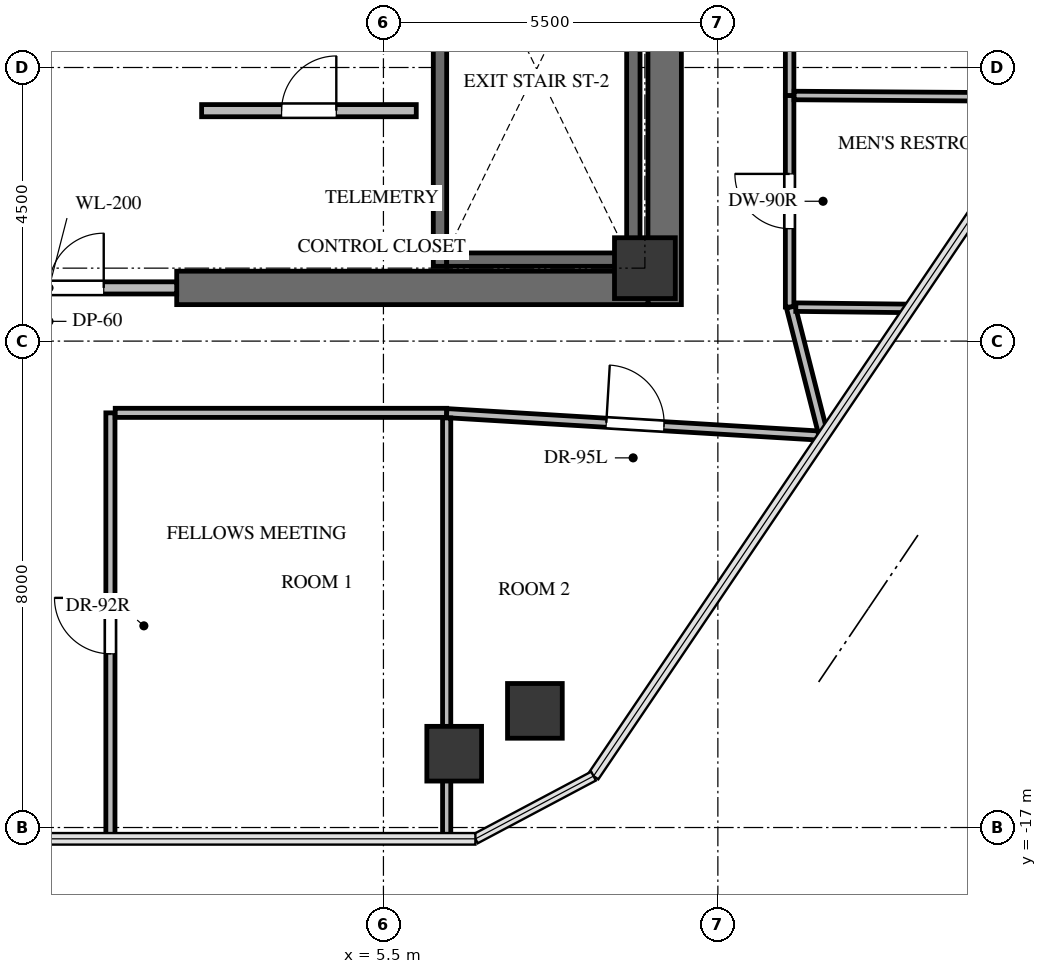
"""IFC4 building model, lengths in metres.
Left out: names, types, materials, properties, quantities, classifications, styles, units other than length and angle.
Written with IfcOpenShell. Run it as: python <this file> out.ifc"""

import sys

from ifc_helpers import new_model, si_unit, direction, frame, frame_2d, origin, origin_2d, place, context, subcontext, project, spatial, rectangle, extrude, source, transform, mapped, element, fill, save


model = new_model("IFC4")
c1 = context("Model", 3, precision=1e-05, world=origin(), true_north=direction((0.0, 1.0)))
c2 = subcontext(c1, "Body", "Model", "MODEL_VIEW")
j1 = project(units=[si_unit("LENGTHUNIT", "METRE"), si_unit("PLANEANGLEUNIT", "RADIAN")], contexts=[c1])
p1 = place(None, origin())
s1 = spatial("IfcSite", under=j1, at=p1, CompositionType="ELEMENT")
p2 = place(p1, origin())
s2 = spatial("IfcBuilding", under=s1, at=p2, CompositionType="ELEMENT")
p3 = place(p2, frame((0.0, 0.0, 258.1)))
s3 = spatial("IfcBuildingStorey", under=s2, at=p3, CompositionType="ELEMENT", Elevation=258.1)
p4 = place(p3, frame((10.125, -8.4, 0.0), z_axis=(0.0, 0.0, 1.0), x_axis=(0.0, 1.0, 0.0)))
e1 = element("IfcWall", 1, at=p4, inside=s3, PredefinedType="SHEAR", context=c2, shape_type="SweptSolid", body=[
    extrude(rectangle(XDim=16.8, YDim=0.55, at=frame_2d((8.4, 0.0))), origin(), (0.0, 0.0, 1.0), 3.4),
])
p5 = place(p3, frame((2.1, -8.125, 0.0), z_axis=(0.0, 0.0, 1.0), x_axis=(1.0, 0.0, 0.0)))
e2 = element("IfcWall", 2, at=p5, inside=s3, PredefinedType="SHEAR", context=c2, shape_type="SweptSolid", body=[
    extrude(rectangle(XDim=7.75, YDim=0.55, at=frame_2d((3.875, 0.0))), origin(), (0.0, 0.0, 1.0), 3.4),
])
p6 = place(p3, frame((9.61, -7.77, -0.24), z_axis=(0.0, 0.0, 1.0), x_axis=(0.0, 1.0, 0.0)))
e3 = element("IfcWall", 3, at=p6, inside=s3, PredefinedType="SHEAR", context=c2, shape_type="SweptSolid", body=[
    extrude(rectangle(XDim=7.89, YDim=0.22, at=frame_2d((3.945, 0.0))), origin(), (0.0, 0.0, 1.0), 3.4),
])
p7 = place(p3, frame((6.43, 0.12, -0.24), z_axis=(0.0, 0.0, 1.0), x_axis=(0.0, -1.0, 0.0)))
e4 = element("IfcWall", 4, at=p7, inside=s3, PredefinedType="SHEAR", context=c2, shape_type="SweptSolid", body=[
    extrude(rectangle(XDim=7.89, YDim=0.22, at=frame_2d((3.945, 0.0))), origin(), (0.0, 0.0, 1.0), 3.4),
])
p8 = place(p7, frame((0.52, 0.0, 0.0)))
e5 = element("IfcOpeningElement", 5, at=p8, cuts=e4, PredefinedType="OPENING", context=c2, shape_type="SweptSolid", body=[
    extrude(rectangle(XDim=1.05, YDim=2.15, at=frame_2d((0.525, 1.075))), frame((0.0, 0.12, 0.0), z_axis=(0.0, -1.0, 0.0), x_axis=(1.0, 0.0, 0.0)), (0.0, 0.0, 1.0), 0.24),
])
p9 = place(p3, frame((6.54, -7.66, -0.24), z_axis=(0.0, 0.0, 1.0), x_axis=(1.0, 0.0, 0.0)))
e6 = element("IfcWall", 6, at=p9, inside=s3, PredefinedType="SHEAR", context=c2, shape_type="SweptSolid", body=[
    extrude(rectangle(XDim=2.96, YDim=0.22, at=frame_2d((1.48, 0.0))), origin(), (0.0, 0.0, 1.0), 3.4),
])
m1 = source(origin(), c2, "Body", "SweptSolid", [
    extrude(rectangle(XDim=1.0, YDim=1.0, at=origin_2d()), origin(), (0.0, 0.0, 1.0), 3.4),
])
p10 = place(p3, frame((9.8, -7.8, -0.24), z_axis=(0.0, 0.0, 1.0), x_axis=(1.0, 0.0, 0.0)))
e7 = element("IfcColumn", 7, at=p10, inside=s3, PredefinedType="COLUMN", context=c2, shape_type="MappedRepresentation", body=[
    mapped(m1, transform((0.0, 0.0, 0.0), x_axis=(1.0, 0.0, 0.0), y_axis=(0.0, 1.0, 0.0), z_axis=(0.0, 0.0, 1.0), scale=1.0)),
])
m2 = source(origin(), c2, "Body", "SweptSolid", [
    extrude(rectangle(XDim=0.9, YDim=0.9, at=origin_2d()), origin(), (0.0, 0.0, 1.0), 3.4),
])
for number, where, z_axis, x_axis in (
    (8, (7.991, -15.081, -0.24), (0.0, 0.0, 1.0), (1.0, 0.0, 0.0)),
    (9, (6.664, -15.786, -0.24), (0.0, 0.0, 1.0), (1.0, 0.0, 0.0)),
):
    element("IfcColumn", number, at=place(p3, frame(where, z_axis=z_axis, x_axis=x_axis)), inside=s3, PredefinedType="COLUMN", context=c2, shape_type="MappedRepresentation", body=[
        mapped(m2, transform((0.0, 0.0, 0.0), x_axis=(1.0, 0.0, 0.0), y_axis=(0.0, 1.0, 0.0), z_axis=(0.0, 0.0, 1.0), scale=1.0)),
    ])
p11 = place(p3, frame((-2.1, -8.125, 0.0), z_axis=(0.0, 0.0, 1.0), x_axis=(1.0, 0.0, 0.0)))
e10 = element("IfcWall", 10, at=p11, inside=s3, PredefinedType="SOLIDWALL", context=c2, shape_type="SweptSolid", body=[
    extrude(rectangle(XDim=4.2, YDim=0.2, at=frame_2d((2.1, 0.0))), origin(), (0.0, 0.0, 1.0), 3.145),
])
p12 = place(p11, frame((1.2, 0.0, 0.0)))
e11 = element("IfcOpeningElement", 11, at=p12, cuts=e10, PredefinedType="OPENING", context=c2, shape_type="SweptSolid", body=[
    extrude(rectangle(XDim=1.8, YDim=2.15, at=frame_2d((0.9, 1.075))), frame((0.0, 0.11, 0.0), z_axis=(0.0, -1.0, 0.0), x_axis=(1.0, 0.0, 0.0)), (0.0, 0.0, 1.0), 0.22),
])
p13 = place(p3, frame((2.51, -5.21, 0.0), z_axis=(0.0, 0.0, 1.0), x_axis=(1.0, 0.0, 0.0)))
e12 = element("IfcWall", 12, at=p13, inside=s3, PredefinedType="SOLIDWALL", context=c2, shape_type="SweptSolid", body=[
    extrude(rectangle(XDim=3.53, YDim=0.2, at=frame_2d((1.765, 0.0))), origin(), (0.0, 0.0, 1.0), 3.145),
])
p14 = place(p13, frame((1.315, 0.0, 0.0)))
e13 = element("IfcOpeningElement", 13, at=p14, cuts=e12, PredefinedType="OPENING", context=c2, shape_type="SweptSolid", body=[
    extrude(rectangle(XDim=0.9, YDim=2.05, at=frame_2d((0.45, 1.025))), frame((0.0, 0.11, 0.0), z_axis=(0.0, -1.0, 0.0), x_axis=(1.0, 0.0, 0.0)), (0.0, 0.0, 1.0), 0.22),
])
p15 = place(p3, frame((12.18, -8.44, 0.0), z_axis=(0.0, 0.0, 1.0), x_axis=(0.0, 1.0, 0.0)))
e14 = element("IfcWall", 14, at=p15, inside=s3, PredefinedType="PARTITIONING", context=c2, shape_type="SweptSolid", body=[
    extrude(rectangle(XDim=3.48, YDim=0.14, at=frame_2d((1.74, 0.0))), origin(), (0.0, 0.0, 1.0), 2.499),
])
p16 = place(p15, frame((1.29, 0.0, 0.0)))
e15 = element("IfcOpeningElement", 15, at=p16, cuts=e14, PredefinedType="OPENING", context=c2, shape_type="SweptSolid", body=[
    extrude(rectangle(XDim=0.9, YDim=2.05, at=frame_2d((0.45, 1.025))), frame((0.0, 0.08, 0.0), z_axis=(0.0, -1.0, 0.0), x_axis=(1.0, 0.0, 0.0)), (0.0, 0.0, 1.0), 0.16),
])
p17 = place(p3, frame((12.18, -4.96, 0.0), z_axis=(0.0, 0.0, 1.0), x_axis=(0.0, 1.0, 0.0)))
e16 = element("IfcWall", 16, at=p17, inside=s3, PredefinedType="PARTITIONING", context=c2, shape_type="SweptSolid", body=[
    extrude(rectangle(XDim=3.4, YDim=0.14, at=frame_2d((1.7, 0.0))), origin(), (0.0, 0.0, 1.0), 3.145),
])
p18 = place(p17, frame((1.25, 0.0, 0.0)))
e17 = element("IfcOpeningElement", 17, at=p18, cuts=e16, PredefinedType="OPENING", context=c2, shape_type="SweptSolid", body=[
    extrude(rectangle(XDim=0.9, YDim=2.05, at=frame_2d((0.45, 1.025))), frame((0.0, 0.08, 0.0), z_axis=(0.0, -1.0, 0.0), x_axis=(1.0, 0.0, 0.0)), (0.0, 0.0, 1.0), 0.16),
])
p19 = place(p3, frame((1.01, -17.186, 0.0), z_axis=(0.0, 0.0, 1.0), x_axis=(0.0, 1.0, 0.0)))
e18 = element("IfcWall", 18, at=p19, inside=s3, PredefinedType="PARTITIONING", context=c2, shape_type="SweptSolid", body=[
    extrude(rectangle(XDim=7.006, YDim=0.15, at=frame_2d((3.503, 0.0))), origin(), (0.0, 0.0, 1.0), 2.499),
])
p20 = place(p19, frame((3.043, 0.0, 0.0)))
e19 = element("IfcOpeningElement", 19, at=p20, cuts=e18, PredefinedType="OPENING", context=c2, shape_type="SweptSolid", body=[
    extrude(rectangle(XDim=0.92, YDim=2.1, at=frame_2d((0.46, 1.05))), frame((0.0, 0.085, 0.0), z_axis=(0.0, -1.0, 0.0), x_axis=(1.0, 0.0, 0.0)), (0.0, 0.0, 1.0), 0.17),
])
p21 = place(p3, frame((1.089, -10.18, 0.0), z_axis=(0.0, 0.0, 1.0), x_axis=(1.0, 0.0, 0.0)))
e20 = element("IfcWall", 20, at=p21, inside=s3, PredefinedType="PARTITIONING", context=c2, shape_type="SweptSolid", body=[
    extrude(rectangle(XDim=5.451, YDim=0.15, at=frame_2d((2.726, 0.0))), origin(), (0.0, 0.0, 1.0), 2.401),
])
p22 = place(p3, frame((6.54, -10.185, 0.0), z_axis=(0.0, 0.0, 1.0), x_axis=(0.9981941592, -0.060070130174, 0.0)))
e21 = element("IfcWall", 21, at=p22, inside=s3, PredefinedType="PARTITIONING", context=c2, shape_type="SweptSolid", body=[
    extrude(rectangle(XDim=6.21, YDim=0.15, at=frame_2d((3.105, 0.0))), origin(), (0.0, 0.0, 1.0), 2.499),
])
p23 = place(p22, frame((2.63, 0.0, 0.0)))
e22 = element("IfcOpeningElement", 22, at=p23, cuts=e21, PredefinedType="OPENING", context=c2, shape_type="SweptSolid", body=[
    extrude(rectangle(XDim=0.95, YDim=2.1, at=frame_2d((0.475, 1.05))), frame((0.0, 0.085, 0.0), z_axis=(0.0, -1.0, 0.0), x_axis=(1.0, 0.0, 0.0)), (0.0, 0.0, 1.0), 0.17),
])
p24 = place(p3, frame((12.719, -10.477, 0.0), z_axis=(0.0, 0.0, 1.0), x_axis=(-0.246550381988, 0.96912997536, 0.0)))
e23 = element("IfcWall", 23, at=p24, inside=s3, PredefinedType="PARTITIONING", context=c2, shape_type="SweptSolid", body=[
    extrude(rectangle(XDim=2.102, YDim=0.15, at=frame_2d((1.051, 0.0))), origin(), (0.0, 0.0, 1.0), 2.499),
])
p25 = place(p3, frame((12.254, -4.96, 0.0), z_axis=(0.0, 0.0, 1.0), x_axis=(0.999976630429, -0.006836563198, 0.0)))
e24 = element("IfcWall", 24, at=p25, inside=s3, PredefinedType="PARTITIONING", context=c2, shape_type="SweptSolid", body=[
    extrude(rectangle(XDim=4.25, YDim=0.14, at=frame_2d((2.125, 0.0))), origin(), (0.0, 0.0, 1.0), 2.499),
])
p26 = place(p3, frame((14.156, -8.462, 0.0), z_axis=(0.0, 0.0, 1.0), x_axis=(-0.999935742613, 0.011336253532, 0.0)))
e25 = element("IfcWall", 25, at=p26, inside=s3, PredefinedType="PARTITIONING", context=c2, shape_type="SweptSolid", body=[
    extrude(rectangle(XDim=1.874, YDim=0.14, at=frame_2d((0.937, 0.0))), origin(), (0.0, 0.0, 1.0), 2.499),
])
p27 = place(p3, frame((6.54, -10.264, 0.0), z_axis=(0.0, 0.0, 1.0), x_axis=(0.0, -1.0, 0.0)))
e26 = element("IfcWall", 26, at=p27, inside=s3, PredefinedType="PARTITIONING", context=c2, shape_type="SweptSolid", body=[
    extrude(rectangle(XDim=5.606, YDim=0.135, at=frame_2d((2.803, 0.0))), origin(), (0.0, 0.0, 1.0), 2.401),
])
p28 = place(p3, frame((6.54, -15.87, 0.0), z_axis=(0.0, 0.0, 1.0), x_axis=(0.0, -1.0, 0.0)))
e27 = element("IfcWall", 27, at=p28, inside=s3, PredefinedType="PARTITIONING", context=c2, shape_type="SweptSolid", body=[
    extrude(rectangle(XDim=1.316, YDim=0.135, at=frame_2d((0.658, 0.0))), origin(), (0.0, 0.0, 1.0), 1.977),
])
m3 = source(origin(), c2, "Body", "SweptSolid", [
    extrude(rectangle(XDim=1.8, YDim=2.15, at=frame_2d((0.9, 1.075))), frame((0.0, 0.025, 0.0), z_axis=(0.0, -1.0, 0.0), x_axis=(1.0, 0.0, 0.0)), (0.0, 0.0, 1.0), 0.05),
])
p29 = place(p12, origin())
e28 = element("IfcDoor", 28, at=p29, inside=s3, OperationType="DOUBLE_DOOR_SINGLE_SWING", PredefinedType="DOOR", context=c2, shape_type="MappedRepresentation", body=[
    mapped(m3, transform((0.0, 0.0, 0.0), x_axis=(1.0, 0.0, 0.0), y_axis=(0.0, 1.0, 0.0), z_axis=(0.0, 0.0, 1.0), scale=1.0)),
])
fill(e11, e28)
m4 = source(origin(), c2, "Body", "SweptSolid", [
    extrude(rectangle(XDim=0.9, YDim=2.05, at=frame_2d((0.45, 1.025))), frame((0.0, 0.025, 0.0), z_axis=(0.0, -1.0, 0.0), x_axis=(1.0, 0.0, 0.0)), (0.0, 0.0, 1.0), 0.05),
])
p30 = place(p14, origin())
e29 = element("IfcDoor", 29, at=p30, inside=s3, OperationType="SINGLE_SWING_RIGHT", PredefinedType="DOOR", context=c2, shape_type="MappedRepresentation", body=[
    mapped(m4, transform((0.0, 0.0, 0.0), x_axis=(1.0, 0.0, 0.0), y_axis=(0.0, 1.0, 0.0), z_axis=(0.0, 0.0, 1.0), scale=1.0)),
])
fill(e13, e29)
m5 = source(origin(), c2, "Body", "SweptSolid", [
    extrude(rectangle(XDim=0.9, YDim=2.05, at=frame_2d((0.45, 1.025))), frame((0.0, 0.025, 0.0), z_axis=(0.0, -1.0, 0.0), x_axis=(1.0, 0.0, 0.0)), (0.0, 0.0, 1.0), 0.05),
])
p31 = place(p16, origin())
e30 = element("IfcDoor", 30, at=p31, inside=s3, OperationType="SINGLE_SWING_RIGHT", PredefinedType="DOOR", context=c2, shape_type="MappedRepresentation", body=[
    mapped(m5, transform((0.0, 0.0, 0.0), x_axis=(1.0, 0.0, 0.0), y_axis=(0.0, 1.0, 0.0), z_axis=(0.0, 0.0, 1.0), scale=1.0)),
])
fill(e15, e30)
m6 = source(origin(), c2, "Body", "SweptSolid", [
    extrude(rectangle(XDim=0.92, YDim=2.1, at=frame_2d((0.46, 1.05))), frame((0.0, 0.025, 0.0), z_axis=(0.0, -1.0, 0.0), x_axis=(1.0, 0.0, 0.0)), (0.0, 0.0, 1.0), 0.05),
])
p32 = place(p20, origin())
e31 = element("IfcDoor", 31, at=p32, inside=s3, OperationType="SINGLE_SWING_RIGHT", PredefinedType="DOOR", context=c2, shape_type="MappedRepresentation", body=[
    mapped(m6, transform((0.0, 0.0, 0.0), x_axis=(1.0, 0.0, 0.0), y_axis=(0.0, 1.0, 0.0), z_axis=(0.0, 0.0, 1.0), scale=1.0)),
])
fill(e19, e31)
m7 = source(origin(), c2, "Body", "SweptSolid", [
    extrude(rectangle(XDim=0.95, YDim=2.1, at=frame_2d((0.475, 1.05))), frame((0.0, 0.025, 0.0), z_axis=(0.0, -1.0, 0.0), x_axis=(1.0, 0.0, 0.0)), (0.0, 0.0, 1.0), 0.05),
])
p33 = place(p23, origin())
e32 = element("IfcDoor", 32, at=p33, inside=s3, OperationType="SINGLE_SWING_LEFT", PredefinedType="DOOR", context=c2, shape_type="MappedRepresentation", body=[
    mapped(m7, transform((0.0, 0.0, 0.0), x_axis=(1.0, 0.0, 0.0), y_axis=(0.0, 1.0, 0.0), z_axis=(0.0, 0.0, 1.0), scale=1.0)),
])
fill(e22, e32)
save(model, sys.argv[1])
